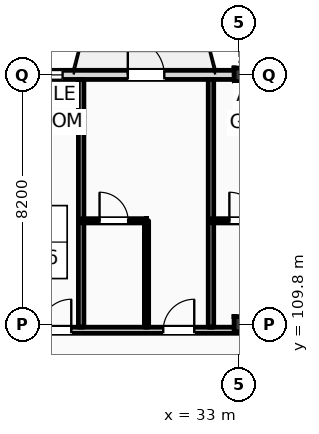
"""IFC4 building model, lengths in metres.
Left out: names, types, materials, properties, quantities, classifications, styles, units other than length and angle.
Written with IfcOpenShell. Run it as: python <this file> out.ifc"""

import sys

from ifc_helpers import new_model, si_unit, direction, frame, frame_2d, origin, origin_2d, place, context, subcontext, project, spatial, rectangle, i_section, extrude, element, fill, save


model = new_model("IFC4")
c1 = context("Model", 3, precision=1e-05, world=origin(), true_north=direction((0.0, 1.0)))
c2 = subcontext(c1, "Body", "Model", "MODEL_VIEW")
j1 = project(units=[si_unit("LENGTHUNIT", "METRE"), si_unit("PLANEANGLEUNIT", "RADIAN")], contexts=[c1])
p1 = place(None, origin())
s1 = spatial("IfcSite", under=j1, at=p1, CompositionType="ELEMENT")
p2 = place(p1, origin())
s2 = spatial("IfcBuilding", under=s1, at=p2, CompositionType="ELEMENT")
p3 = place(p2, frame((0.0, 0.0, 31.8)))
s3 = spatial("IfcBuildingStorey", under=s2, at=p3, CompositionType="ELEMENT", Elevation=31.8)
p4 = place(p3, frame((33.0, 109.8, 0.0), z_axis=(0.0, 0.0, 1.0), x_axis=(1.0, 0.0, 0.0)))
e1 = element("IfcColumn", 1, at=p4, inside=s3, PredefinedType="COLUMN", context=c2, shape_type="SweptSolid", body=[
    extrude(i_section(OverallWidth=0.3, OverallDepth=0.5, WebThickness=0.014, FlangeThickness=0.028, FilletRadius=0.027, at=origin_2d()), origin(), (0.0, 0.0, 1.0), 3.6),
])
p5 = place(p3, frame((33.0, 118.0, 0.0), z_axis=(0.0, 0.0, 1.0), x_axis=(1.0, 0.0, 0.0)))
e2 = element("IfcColumn", 2, at=p5, inside=s3, PredefinedType="COLUMN", context=c2, shape_type="SweptSolid", body=[
    extrude(i_section(OverallWidth=0.3, OverallDepth=0.45, WebThickness=0.014, FlangeThickness=0.026, FilletRadius=0.027, at=origin_2d()), origin(), (0.0, 0.0, 1.0), 3.6),
])
p6 = place(p3, frame((22.5, 118.0, 0.0), z_axis=(0.0, 0.0, 1.0), x_axis=(1.0, 0.0, 0.0)))
e3 = element("IfcWall", 3, at=p6, inside=s3, PredefinedType="STANDARD", context=c2, shape_type="SweptSolid", body=[
    extrude(rectangle(XDim=97.5, YDim=0.3, at=frame_2d((48.75, 0.0))), origin(), (0.0, 0.0, 1.0), 2.72),
])
p7 = place(p6, frame((3.61, 0.0, 0.9)))
e4 = element("IfcOpeningElement", 4, at=p7, cuts=e3, PredefinedType="OPENING", context=c2, shape_type="SweptSolid", body=[
    extrude(rectangle(XDim=1.1, YDim=1.64, at=frame_2d((0.55, 0.82))), frame((0.0, 0.16, 0.0), z_axis=(0.0, -1.0, 0.0), x_axis=(1.0, 0.0, 0.0)), (0.0, 0.0, 1.0), 0.32),
])
p8 = place(p6, frame((6.855, 0.0, 0.0)))
e5 = element("IfcOpeningElement", 5, at=p8, cuts=e3, PredefinedType="OPENING", context=c2, shape_type="SweptSolid", body=[
    extrude(rectangle(XDim=1.2, YDim=2.25, at=frame_2d((0.6, 1.125))), frame((0.0, 0.16, 0.0), z_axis=(0.0, -1.0, 0.0), x_axis=(1.0, 0.0, 0.0)), (0.0, 0.0, 1.0), 0.32),
])
p9 = place(p6, frame((11.405, 0.0, 0.9)))
e6 = element("IfcOpeningElement", 6, at=p9, cuts=e3, PredefinedType="OPENING", context=c2, shape_type="SweptSolid", body=[
    extrude(rectangle(XDim=2.1, YDim=1.64, at=frame_2d((1.05, 0.82))), frame((0.0, 0.16, 0.0), z_axis=(0.0, -1.0, 0.0), x_axis=(1.0, 0.0, 0.0)), (0.0, 0.0, 1.0), 0.32),
])
p10 = place(p6, frame((15.13, 0.0, 0.9)))
e7 = element("IfcOpeningElement", 7, at=p10, cuts=e3, PredefinedType="OPENING", context=c2, shape_type="SweptSolid", body=[
    extrude(rectangle(XDim=2.25, YDim=1.64, at=frame_2d((1.125, 0.82))), frame((0.0, 0.16, 0.0), z_axis=(0.0, -1.0, 0.0), x_axis=(1.0, 0.0, 0.0)), (0.0, 0.0, 1.0), 0.32),
])
p11 = place(p6, frame((21.53, 0.0, 0.0)))
e8 = element("IfcOpeningElement", 8, at=p11, cuts=e3, PredefinedType="OPENING", context=c2, shape_type="SweptSolid", body=[
    extrude(rectangle(XDim=1.2, YDim=2.25, at=frame_2d((0.6, 1.125))), frame((0.0, 0.16, 0.0), z_axis=(0.0, -1.0, 0.0), x_axis=(1.0, 0.0, 0.0)), (0.0, 0.0, 1.0), 0.32),
])
p12 = place(p6, frame((24.18, 0.0, 0.9)))
e9 = element("IfcOpeningElement", 9, at=p12, cuts=e3, PredefinedType="OPENING", context=c2, shape_type="SweptSolid", body=[
    extrude(rectangle(XDim=1.1, YDim=1.64, at=frame_2d((0.55, 0.82))), frame((0.0, 0.16, 0.0), z_axis=(0.0, -1.0, 0.0), x_axis=(1.0, 0.0, 0.0)), (0.0, 0.0, 1.0), 0.32),
])
p13 = place(p6, frame((29.105, 0.0, 0.9)))
e10 = element("IfcOpeningElement", 10, at=p13, cuts=e3, PredefinedType="OPENING", context=c2, shape_type="SweptSolid", body=[
    extrude(rectangle(XDim=2.7, YDim=1.64, at=frame_2d((1.35, 0.82))), frame((0.0, 0.16, 0.0), z_axis=(0.0, -1.0, 0.0), x_axis=(1.0, 0.0, 0.0)), (0.0, 0.0, 1.0), 0.32),
])
p14 = place(p6, frame((34.83, 0.0, 0.9)))
e11 = element("IfcOpeningElement", 11, at=p14, cuts=e3, PredefinedType="OPENING", context=c2, shape_type="SweptSolid", body=[
    extrude(rectangle(XDim=1.8, YDim=1.64, at=frame_2d((0.9, 0.82))), frame((0.0, 0.16, 0.0), z_axis=(0.0, -1.0, 0.0), x_axis=(1.0, 0.0, 0.0)), (0.0, 0.0, 1.0), 0.32),
])
p15 = place(p6, frame((38.525, 0.0, 0.0)))
e12 = element("IfcOpeningElement", 12, at=p15, cuts=e3, PredefinedType="OPENING", context=c2, shape_type="SweptSolid", body=[
    extrude(rectangle(XDim=1.2, YDim=2.25, at=frame_2d((0.6, 1.125))), frame((0.0, 0.16, 0.0), z_axis=(0.0, -1.0, 0.0), x_axis=(1.0, 0.0, 0.0)), (0.0, 0.0, 1.0), 0.32),
])
p16 = place(p6, frame((42.73, 0.0, 0.9)))
e13 = element("IfcOpeningElement", 13, at=p16, cuts=e3, PredefinedType="OPENING", context=c2, shape_type="SweptSolid", body=[
    extrude(rectangle(XDim=3.05, YDim=1.64, at=frame_2d((1.525, 0.82))), frame((0.0, 0.16, 0.0), z_axis=(0.0, -1.0, 0.0), x_axis=(1.0, 0.0, 0.0)), (0.0, 0.0, 1.0), 0.32),
])
p17 = place(p6, frame((47.155, 0.0, 0.9)))
e14 = element("IfcOpeningElement", 14, at=p17, cuts=e3, PredefinedType="OPENING", context=c2, shape_type="SweptSolid", body=[
    extrude(rectangle(XDim=1.35, YDim=1.64, at=frame_2d((0.675, 0.82))), frame((0.0, 0.16, 0.0), z_axis=(0.0, -1.0, 0.0), x_axis=(1.0, 0.0, 0.0)), (0.0, 0.0, 1.0), 0.32),
])
p18 = place(p6, frame((53.065, 0.0, 0.0)))
e15 = element("IfcOpeningElement", 15, at=p18, cuts=e3, PredefinedType="OPENING", context=c2, shape_type="SweptSolid", body=[
    extrude(rectangle(XDim=1.2, YDim=2.25, at=frame_2d((0.6, 1.125))), frame((0.0, 0.16, 0.0), z_axis=(0.0, -1.0, 0.0), x_axis=(1.0, 0.0, 0.0)), (0.0, 0.0, 1.0), 0.32),
])
p19 = place(p6, frame((58.2, 0.0, 0.9)))
e16 = element("IfcOpeningElement", 16, at=p19, cuts=e3, PredefinedType="OPENING", context=c2, shape_type="SweptSolid", body=[
    extrude(rectangle(XDim=1.8, YDim=1.64, at=frame_2d((0.9, 0.82))), frame((0.0, 0.16, 0.0), z_axis=(0.0, -1.0, 0.0), x_axis=(1.0, 0.0, 0.0)), (0.0, 0.0, 1.0), 0.32),
])
p20 = place(p6, frame((61.13, 0.0, 0.9)))
e17 = element("IfcOpeningElement", 17, at=p20, cuts=e3, PredefinedType="OPENING", context=c2, shape_type="SweptSolid", body=[
    extrude(rectangle(XDim=3.05, YDim=1.64, at=frame_2d((1.525, 0.82))), frame((0.0, 0.16, 0.0), z_axis=(0.0, -1.0, 0.0), x_axis=(1.0, 0.0, 0.0)), (0.0, 0.0, 1.0), 0.32),
])
p21 = place(p6, frame((67.93, 0.0, 0.0)))
e18 = element("IfcOpeningElement", 18, at=p21, cuts=e3, PredefinedType="OPENING", context=c2, shape_type="SweptSolid", body=[
    extrude(rectangle(XDim=1.2, YDim=2.25, at=frame_2d((0.6, 1.125))), frame((0.0, 0.16, 0.0), z_axis=(0.0, -1.0, 0.0), x_axis=(1.0, 0.0, 0.0)), (0.0, 0.0, 1.0), 0.32),
])
p22 = place(p6, frame((70.39, 0.0, 0.0)))
e19 = element("IfcOpeningElement", 19, at=p22, cuts=e3, PredefinedType="OPENING", context=c2, shape_type="SweptSolid", body=[
    extrude(rectangle(XDim=1.2, YDim=2.25, at=frame_2d((0.6, 1.125))), frame((0.0, 0.16, 0.0), z_axis=(0.0, -1.0, 0.0), x_axis=(1.0, 0.0, 0.0)), (0.0, 0.0, 1.0), 0.32),
])
p23 = place(p6, frame((75.905, 0.0, 0.9)))
e20 = element("IfcOpeningElement", 20, at=p23, cuts=e3, PredefinedType="OPENING", context=c2, shape_type="SweptSolid", body=[
    extrude(rectangle(XDim=1.1, YDim=1.5, at=frame_2d((0.55, 0.75))), frame((0.0, 0.16, 0.0), z_axis=(0.0, -1.0, 0.0), x_axis=(1.0, 0.0, 0.0)), (0.0, 0.0, 1.0), 0.32),
])
p24 = place(p6, frame((81.63, 0.0, 0.9)))
e21 = element("IfcOpeningElement", 21, at=p24, cuts=e3, PredefinedType="OPENING", context=c2, shape_type="SweptSolid", body=[
    extrude(rectangle(XDim=1.1, YDim=1.6, at=frame_2d((0.55, 0.8))), frame((0.0, 0.16, 0.0), z_axis=(0.0, -1.0, 0.0), x_axis=(1.0, 0.0, 0.0)), (0.0, 0.0, 1.0), 0.32),
])
p25 = place(p6, frame((84.955, 0.0, 0.9)))
e22 = element("IfcOpeningElement", 22, at=p25, cuts=e3, PredefinedType="OPENING", context=c2, shape_type="SweptSolid", body=[
    extrude(rectangle(XDim=1.4, YDim=1.64, at=frame_2d((0.7, 0.82))), frame((0.0, 0.16, 0.0), z_axis=(0.0, -1.0, 0.0), x_axis=(1.0, 0.0, 0.0)), (0.0, 0.0, 1.0), 0.32),
])
p26 = place(p6, frame((90.055, 0.0, 0.9)))
e23 = element("IfcOpeningElement", 23, at=p26, cuts=e3, PredefinedType="OPENING", context=c2, shape_type="SweptSolid", body=[
    extrude(rectangle(XDim=1.6, YDim=1.64, at=frame_2d((0.8, 0.82))), frame((0.0, 0.16, 0.0), z_axis=(0.0, -1.0, 0.0), x_axis=(1.0, 0.0, 0.0)), (0.0, 0.0, 1.0), 0.32),
])
p27 = place(p6, frame((93.87, 0.0, 0.9)))
e24 = element("IfcOpeningElement", 24, at=p27, cuts=e3, PredefinedType="OPENING", context=c2, shape_type="SweptSolid", body=[
    extrude(rectangle(XDim=1.75, YDim=1.64, at=frame_2d((0.875, 0.82))), frame((0.0, 0.16, 0.0), z_axis=(0.0, -1.0, 0.0), x_axis=(1.0, 0.0, 0.0)), (0.0, 0.0, 1.0), 0.32),
])
p28 = place(p3, frame((10.65, 109.6, 0.0), z_axis=(0.0, 0.0, 1.0), x_axis=(1.0, 0.0, 0.0)))
e25 = element("IfcWall", 25, at=p28, inside=s3, PredefinedType="PARTITIONING", context=c2, shape_type="SweptSolid", body=[
    extrude(rectangle(XDim=109.21, YDim=0.2, at=frame_2d((54.605, 0.0))), origin(), (0.0, 0.0, 1.0), 2.72),
])
p29 = place(p28, frame((15.825, 0.0, 0.0)))
e26 = element("IfcOpeningElement", 26, at=p29, cuts=e25, PredefinedType="OPENING", context=c2, shape_type="SweptSolid", body=[
    extrude(rectangle(XDim=1.02, YDim=2.2, at=frame_2d((0.51, 1.1))), frame((0.0, 0.11, 0.0), z_axis=(0.0, -1.0, 0.0), x_axis=(1.0, 0.0, 0.0)), (0.0, 0.0, 1.0), 0.22),
])
p30 = place(p28, frame((19.87, 0.0, 0.0)))
e27 = element("IfcOpeningElement", 27, at=p30, cuts=e25, PredefinedType="OPENING", context=c2, shape_type="SweptSolid", body=[
    extrude(rectangle(XDim=1.02, YDim=2.2, at=frame_2d((0.51, 1.1))), frame((0.0, 0.11, 0.0), z_axis=(0.0, -1.0, 0.0), x_axis=(1.0, 0.0, 0.0)), (0.0, 0.0, 1.0), 0.22),
])
p31 = place(p28, frame((24.47, 0.0, 0.0)))
e28 = element("IfcOpeningElement", 28, at=p31, cuts=e25, PredefinedType="OPENING", context=c2, shape_type="SweptSolid", body=[
    extrude(rectangle(XDim=1.02, YDim=2.2, at=frame_2d((0.51, 1.1))), frame((0.0, 0.11, 0.0), z_axis=(0.0, -1.0, 0.0), x_axis=(1.0, 0.0, 0.0)), (0.0, 0.0, 1.0), 0.22),
])
p32 = place(p28, frame((26.92, 0.0, 0.0)))
e29 = element("IfcOpeningElement", 29, at=p32, cuts=e25, PredefinedType="OPENING", context=c2, shape_type="SweptSolid", body=[
    extrude(rectangle(XDim=1.02, YDim=2.2, at=frame_2d((0.51, 1.1))), frame((0.0, 0.11, 0.0), z_axis=(0.0, -1.0, 0.0), x_axis=(1.0, 0.0, 0.0)), (0.0, 0.0, 1.0), 0.22),
])
p33 = place(p28, frame((33.7, 0.0, 0.0)))
e30 = element("IfcOpeningElement", 30, at=p33, cuts=e25, PredefinedType="OPENING", context=c2, shape_type="SweptSolid", body=[
    extrude(rectangle(XDim=0.96, YDim=2.2, at=frame_2d((0.48, 1.1))), frame((0.0, 0.11, 0.0), z_axis=(0.0, -1.0, 0.0), x_axis=(1.0, 0.0, 0.0)), (0.0, 0.0, 1.0), 0.22),
])
p34 = place(p28, frame((35.9, 0.0, 0.0)))
e31 = element("IfcOpeningElement", 31, at=p34, cuts=e25, PredefinedType="OPENING", context=c2, shape_type="SweptSolid", body=[
    extrude(rectangle(XDim=0.96, YDim=2.2, at=frame_2d((0.48, 1.1))), frame((0.0, 0.11, 0.0), z_axis=(0.0, -1.0, 0.0), x_axis=(1.0, 0.0, 0.0)), (0.0, 0.0, 1.0), 0.22),
])
p35 = place(p28, frame((42.9, 0.0, 0.0)))
e32 = element("IfcOpeningElement", 32, at=p35, cuts=e25, PredefinedType="OPENING", context=c2, shape_type="SweptSolid", body=[
    extrude(rectangle(XDim=0.96, YDim=2.2, at=frame_2d((0.48, 1.1))), frame((0.0, 0.11, 0.0), z_axis=(0.0, -1.0, 0.0), x_axis=(1.0, 0.0, 0.0)), (0.0, 0.0, 1.0), 0.22),
])
p36 = place(p28, frame((47.5, 0.0, 0.0)))
e33 = element("IfcOpeningElement", 33, at=p36, cuts=e25, PredefinedType="OPENING", context=c2, shape_type="SweptSolid", body=[
    extrude(rectangle(XDim=0.96, YDim=2.2, at=frame_2d((0.48, 1.1))), frame((0.0, 0.11, 0.0), z_axis=(0.0, -1.0, 0.0), x_axis=(1.0, 0.0, 0.0)), (0.0, 0.0, 1.0), 0.22),
])
p37 = place(p28, frame((49.95, 0.0, 0.0)))
e34 = element("IfcOpeningElement", 34, at=p37, cuts=e25, PredefinedType="OPENING", context=c2, shape_type="SweptSolid", body=[
    extrude(rectangle(XDim=0.96, YDim=2.2, at=frame_2d((0.48, 1.1))), frame((0.0, 0.11, 0.0), z_axis=(0.0, -1.0, 0.0), x_axis=(1.0, 0.0, 0.0)), (0.0, 0.0, 1.0), 0.22),
])
p38 = place(p28, frame((56.7, 0.0, 0.0)))
e35 = element("IfcOpeningElement", 35, at=p38, cuts=e25, PredefinedType="OPENING", context=c2, shape_type="SweptSolid", body=[
    extrude(rectangle(XDim=0.96, YDim=2.2, at=frame_2d((0.48, 1.1))), frame((0.0, 0.11, 0.0), z_axis=(0.0, -1.0, 0.0), x_axis=(1.0, 0.0, 0.0)), (0.0, 0.0, 1.0), 0.22),
])
p39 = place(p28, frame((59.15, 0.0, 0.0)))
e36 = element("IfcOpeningElement", 36, at=p39, cuts=e25, PredefinedType="OPENING", context=c2, shape_type="SweptSolid", body=[
    extrude(rectangle(XDim=0.96, YDim=2.2, at=frame_2d((0.48, 1.1))), frame((0.0, 0.11, 0.0), z_axis=(0.0, -1.0, 0.0), x_axis=(1.0, 0.0, 0.0)), (0.0, 0.0, 1.0), 0.22),
])
p40 = place(p28, frame((65.9, 0.0, 0.0)))
e37 = element("IfcOpeningElement", 37, at=p40, cuts=e25, PredefinedType="OPENING", context=c2, shape_type="SweptSolid", body=[
    extrude(rectangle(XDim=0.96, YDim=2.2, at=frame_2d((0.48, 1.1))), frame((0.0, 0.11, 0.0), z_axis=(0.0, -1.0, 0.0), x_axis=(1.0, 0.0, 0.0)), (0.0, 0.0, 1.0), 0.22),
])
p41 = place(p28, frame((70.5, 0.0, 0.0)))
e38 = element("IfcOpeningElement", 38, at=p41, cuts=e25, PredefinedType="OPENING", context=c2, shape_type="SweptSolid", body=[
    extrude(rectangle(XDim=0.96, YDim=2.2, at=frame_2d((0.48, 1.1))), frame((0.0, 0.11, 0.0), z_axis=(0.0, -1.0, 0.0), x_axis=(1.0, 0.0, 0.0)), (0.0, 0.0, 1.0), 0.22),
])
p42 = place(p28, frame((72.95, 0.0, 0.0)))
e39 = element("IfcOpeningElement", 39, at=p42, cuts=e25, PredefinedType="OPENING", context=c2, shape_type="SweptSolid", body=[
    extrude(rectangle(XDim=0.96, YDim=2.2, at=frame_2d((0.48, 1.1))), frame((0.0, 0.11, 0.0), z_axis=(0.0, -1.0, 0.0), x_axis=(1.0, 0.0, 0.0)), (0.0, 0.0, 1.0), 0.22),
])
p43 = place(p28, frame((79.7, 0.0, 0.0)))
e40 = element("IfcOpeningElement", 40, at=p43, cuts=e25, PredefinedType="OPENING", context=c2, shape_type="SweptSolid", body=[
    extrude(rectangle(XDim=0.96, YDim=2.2, at=frame_2d((0.48, 1.1))), frame((0.0, 0.11, 0.0), z_axis=(0.0, -1.0, 0.0), x_axis=(1.0, 0.0, 0.0)), (0.0, 0.0, 1.0), 0.22),
])
p44 = place(p28, frame((82.15, 0.0, 0.0)))
e41 = element("IfcOpeningElement", 41, at=p44, cuts=e25, PredefinedType="OPENING", context=c2, shape_type="SweptSolid", body=[
    extrude(rectangle(XDim=0.96, YDim=2.2, at=frame_2d((0.48, 1.1))), frame((0.0, 0.11, 0.0), z_axis=(0.0, -1.0, 0.0), x_axis=(1.0, 0.0, 0.0)), (0.0, 0.0, 1.0), 0.22),
])
p45 = place(p28, frame((88.9, 0.0, 0.0)))
e42 = element("IfcOpeningElement", 42, at=p45, cuts=e25, PredefinedType="OPENING", context=c2, shape_type="SweptSolid", body=[
    extrude(rectangle(XDim=0.96, YDim=2.2, at=frame_2d((0.48, 1.1))), frame((0.0, 0.11, 0.0), z_axis=(0.0, -1.0, 0.0), x_axis=(1.0, 0.0, 0.0)), (0.0, 0.0, 1.0), 0.22),
])
p46 = place(p28, frame((93.75, 0.0, 0.0)))
e43 = element("IfcOpeningElement", 43, at=p46, cuts=e25, PredefinedType="OPENING", context=c2, shape_type="SweptSolid", body=[
    extrude(rectangle(XDim=0.96, YDim=2.2, at=frame_2d((0.48, 1.1))), frame((0.0, 0.11, 0.0), z_axis=(0.0, -1.0, 0.0), x_axis=(1.0, 0.0, 0.0)), (0.0, 0.0, 1.0), 0.22),
])
p47 = place(p28, frame((98.1, 0.0, 0.0)))
e44 = element("IfcOpeningElement", 44, at=p47, cuts=e25, PredefinedType="OPENING", context=c2, shape_type="SweptSolid", body=[
    extrude(rectangle(XDim=0.96, YDim=2.2, at=frame_2d((0.48, 1.1))), frame((0.0, 0.11, 0.0), z_axis=(0.0, -1.0, 0.0), x_axis=(1.0, 0.0, 0.0)), (0.0, 0.0, 1.0), 0.22),
])
p48 = place(p28, frame((102.7, 0.0, 0.0)))
e45 = element("IfcOpeningElement", 45, at=p48, cuts=e25, PredefinedType="OPENING", context=c2, shape_type="SweptSolid", body=[
    extrude(rectangle(XDim=0.96, YDim=2.2, at=frame_2d((0.48, 1.1))), frame((0.0, 0.11, 0.0), z_axis=(0.0, -1.0, 0.0), x_axis=(1.0, 0.0, 0.0)), (0.0, 0.0, 1.0), 0.22),
])
p49 = place(p28, frame((105.04, 0.0, 0.0)))
e46 = element("IfcOpeningElement", 46, at=p49, cuts=e25, PredefinedType="OPENING", context=c2, shape_type="SweptSolid", body=[
    extrude(rectangle(XDim=0.96, YDim=2.2, at=frame_2d((0.48, 1.1))), frame((0.0, 0.11, 0.0), z_axis=(0.0, -1.0, 0.0), x_axis=(1.0, 0.0, 0.0)), (0.0, 0.0, 1.0), 0.22),
])
p50 = place(p28, frame((2.716, 0.0, 0.0)))
e47 = element("IfcOpeningElement", 47, at=p50, cuts=e25, PredefinedType="OPENING", context=c2, shape_type="SweptSolid", body=[
    extrude(rectangle(XDim=1.35, YDim=2.25, at=frame_2d((0.675, 1.125))), frame((0.0, 0.11, 0.0), z_axis=(0.0, -1.0, 0.0), x_axis=(1.0, 0.0, 0.0)), (0.0, 0.0, 1.0), 0.22),
])
p51 = place(p28, frame((6.65, 0.0, 0.0)))
e48 = element("IfcOpeningElement", 48, at=p51, cuts=e25, PredefinedType="OPENING", context=c2, shape_type="SweptSolid", body=[
    extrude(rectangle(XDim=1.35, YDim=2.25, at=frame_2d((0.675, 1.125))), frame((0.0, 0.11, 0.0), z_axis=(0.0, -1.0, 0.0), x_axis=(1.0, 0.0, 0.0)), (0.0, 0.0, 1.0), 0.22),
])
p52 = place(p28, frame((10.583, 0.0, 0.0)))
e49 = element("IfcOpeningElement", 49, at=p52, cuts=e25, PredefinedType="OPENING", context=c2, shape_type="SweptSolid", body=[
    extrude(rectangle(XDim=1.35, YDim=2.25, at=frame_2d((0.675, 1.125))), frame((0.0, 0.11, 0.0), z_axis=(0.0, -1.0, 0.0), x_axis=(1.0, 0.0, 0.0)), (0.0, 0.0, 1.0), 0.22),
])
p53 = place(p3, frame((27.82, 109.7, 0.0), z_axis=(0.0, 0.0, 1.0), x_axis=(0.0, 1.0, 0.0)))
e50 = element("IfcWall", 50, at=p53, inside=s3, PredefinedType="PARTITIONING", context=c2, shape_type="SweptSolid", body=[
    extrude(rectangle(XDim=8.15, YDim=0.18, at=frame_2d((4.075, 0.0))), origin(), (0.0, 0.0, 1.0), 3.05),
])
p54 = place(p3, frame((32.09, 109.7, 0.0), z_axis=(0.0, 0.0, 1.0), x_axis=(0.0, 1.0, 0.0)))
e51 = element("IfcWall", 51, at=p54, inside=s3, PredefinedType="PARTITIONING", context=c2, shape_type="SweptSolid", body=[
    extrude(rectangle(XDim=8.15, YDim=0.18, at=frame_2d((4.075, 0.0))), origin(), (0.0, 0.0, 1.0), 3.36),
])
p55 = place(p3, frame((29.97, 109.7, 0.0), z_axis=(0.0, 0.0, 1.0), x_axis=(0.0, 1.0, 0.0)))
e52 = element("IfcWall", 52, at=p55, inside=s3, PredefinedType="PARTITIONING", context=c2, shape_type="SweptSolid", body=[
    extrude(rectangle(XDim=3.5, YDim=0.14, at=frame_2d((1.75, 0.0))), origin(), (0.0, 0.0, 1.0), 3.36),
])
p56 = place(p3, frame((27.82, 113.2, 0.0), z_axis=(0.0, 0.0, 1.0), x_axis=(1.0, 0.0, 0.0)))
e53 = element("IfcWall", 53, at=p56, inside=s3, PredefinedType="PARTITIONING", context=c2, shape_type="SweptSolid", body=[
    extrude(rectangle(XDim=2.15, YDim=0.14, at=frame_2d((1.075, 0.0))), origin(), (0.0, 0.0, 1.0), 3.36),
])
p57 = place(p56, frame((0.605, 0.0, 0.0)))
e54 = element("IfcOpeningElement", 54, at=p57, cuts=e53, PredefinedType="OPENING", context=c2, shape_type="SweptSolid", body=[
    extrude(rectangle(XDim=0.94, YDim=2.15, at=frame_2d((0.47, 1.075))), frame((0.0, 0.08, 0.0), z_axis=(0.0, -1.0, 0.0), x_axis=(1.0, 0.0, 0.0)), (0.0, 0.0, 1.0), 0.16),
])
p58 = place(p3, frame((32.09, 113.2, 0.0), z_axis=(0.0, 0.0, 1.0), x_axis=(1.0, 0.0, 0.0)))
e55 = element("IfcWall", 55, at=p58, inside=s3, PredefinedType="PARTITIONING", context=c2, shape_type="SweptSolid", body=[
    extrude(rectangle(XDim=2.15, YDim=0.14, at=frame_2d((1.075, 0.0))), origin(), (0.0, 0.0, 1.0), 3.36),
])
p59 = place(p58, frame((0.605, 0.0, 0.0)))
e56 = element("IfcOpeningElement", 56, at=p59, cuts=e55, PredefinedType="OPENING", context=c2, shape_type="SweptSolid", body=[
    extrude(rectangle(XDim=0.94, YDim=2.15, at=frame_2d((0.47, 1.075))), frame((0.0, 0.08, 0.0), z_axis=(0.0, -1.0, 0.0), x_axis=(1.0, 0.0, 0.0)), (0.0, 0.0, 1.0), 0.16),
])
p60 = place(p7, origin())
e57 = element("IfcWindow", 57, at=p60, inside=s3, PartitioningType="DOUBLE_PANEL_VERTICAL", PredefinedType="WINDOW", context=c2, shape_type="SweptSolid", body=[
    extrude(rectangle(XDim=1.1, YDim=1.64, at=frame_2d((0.55, 0.82))), frame((0.0, 0.03, 0.0), z_axis=(0.0, -1.0, 0.0), x_axis=(1.0, 0.0, 0.0)), (0.0, 0.0, 1.0), 0.06),
])
fill(e4, e57)
p61 = place(p8, origin())
e58 = element("IfcDoor", 58, at=p61, inside=s3, OperationType="SINGLE_SWING_LEFT", PredefinedType="DOOR", context=c2, shape_type="SweptSolid", body=[
    extrude(rectangle(XDim=1.2, YDim=2.25, at=frame_2d((0.6, 1.125))), frame((0.0, 0.025, 0.0), z_axis=(0.0, -1.0, 0.0), x_axis=(1.0, 0.0, 0.0)), (0.0, 0.0, 1.0), 0.05),
])
fill(e5, e58)
p62 = place(p29, origin())
e59 = element("IfcDoor", 59, at=p62, inside=s3, OperationType="SINGLE_SWING_RIGHT", PredefinedType="DOOR", context=c2, shape_type="SweptSolid", body=[
    extrude(rectangle(XDim=1.02, YDim=2.2, at=frame_2d((0.51, 1.1))), frame((0.0, 0.025, 0.0), z_axis=(0.0, -1.0, 0.0), x_axis=(1.0, 0.0, 0.0)), (0.0, 0.0, 1.0), 0.05),
])
fill(e26, e59)
p63 = place(p30, origin())
e60 = element("IfcDoor", 60, at=p63, inside=s3, OperationType="SINGLE_SWING_RIGHT", PredefinedType="DOOR", context=c2, shape_type="SweptSolid", body=[
    extrude(rectangle(XDim=1.02, YDim=2.2, at=frame_2d((0.51, 1.1))), frame((0.0, 0.025, 0.0), z_axis=(0.0, -1.0, 0.0), x_axis=(1.0, 0.0, 0.0)), (0.0, 0.0, 1.0), 0.05),
])
fill(e27, e60)
p64 = place(p57, origin())
e61 = element("IfcDoor", 61, at=p64, inside=s3, OperationType="SINGLE_SWING_LEFT", PredefinedType="DOOR", context=c2, shape_type="SweptSolid", body=[
    extrude(rectangle(XDim=0.94, YDim=2.15, at=frame_2d((0.47, 1.075))), frame((0.0, 0.025, 0.0), z_axis=(0.0, -1.0, 0.0), x_axis=(1.0, 0.0, 0.0)), (0.0, 0.0, 1.0), 0.05),
])
fill(e54, e61)
p65 = place(p59, origin())
e62 = element("IfcDoor", 62, at=p65, inside=s3, OperationType="SINGLE_SWING_LEFT", PredefinedType="DOOR", context=c2, shape_type="SweptSolid", body=[
    extrude(rectangle(XDim=0.94, YDim=2.15, at=frame_2d((0.47, 1.075))), frame((0.0, 0.025, 0.0), z_axis=(0.0, -1.0, 0.0), x_axis=(1.0, 0.0, 0.0)), (0.0, 0.0, 1.0), 0.05),
])
fill(e56, e62)
save(model, sys.argv[1])
